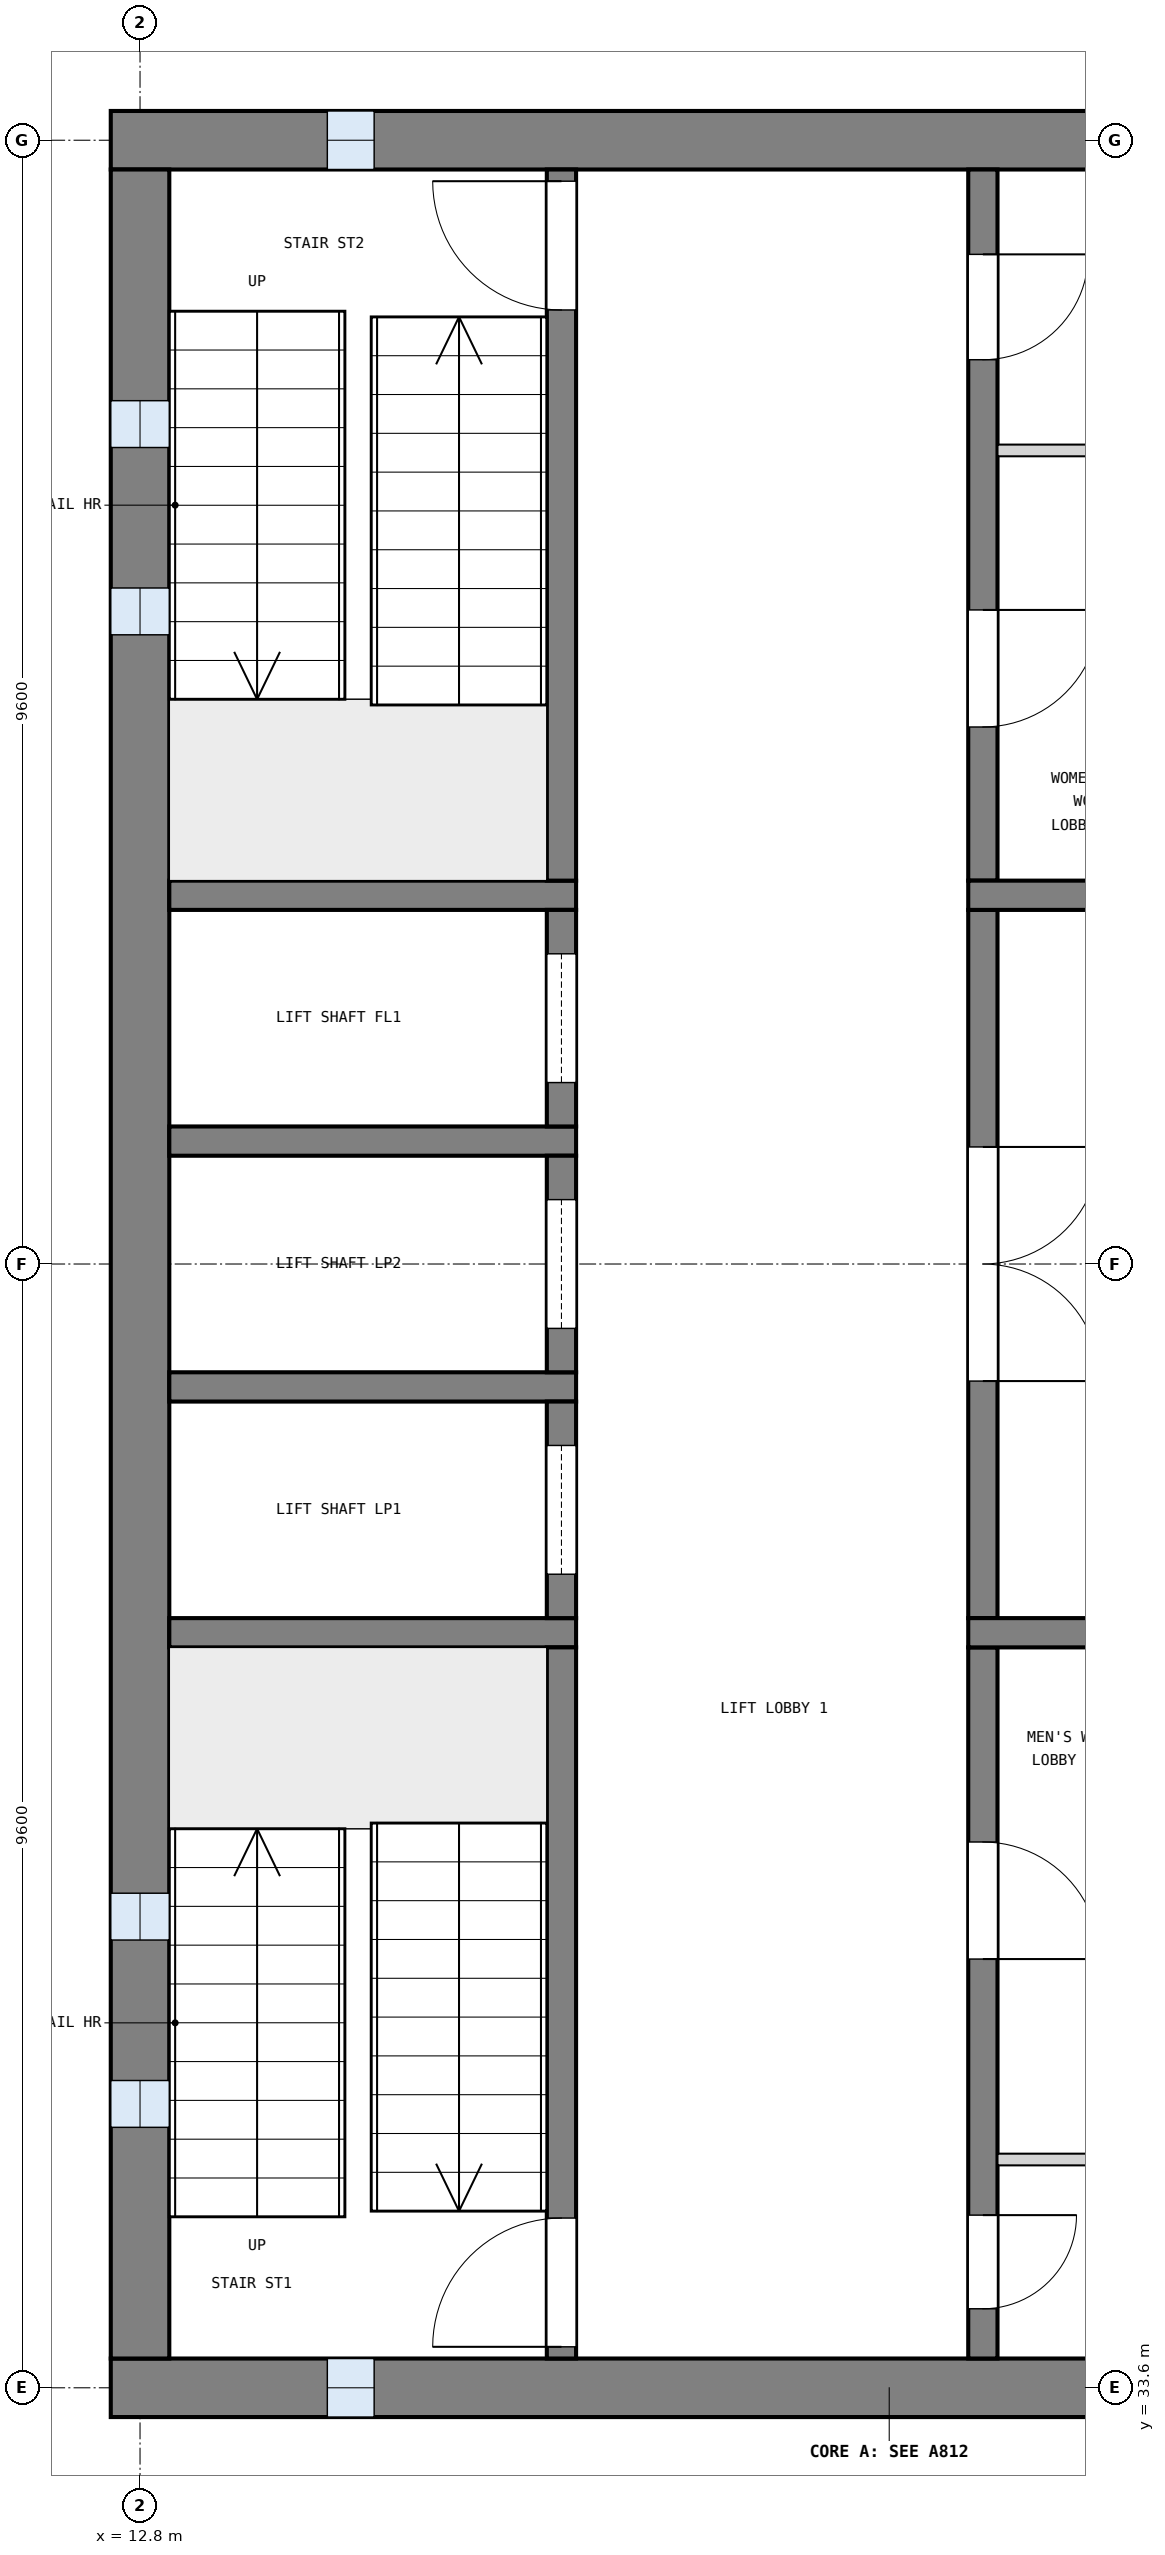
"""IFC4 building model, lengths in metres.
Left out: names, types, materials, properties, quantities, classifications, styles, units other than length and angle.
Written with IfcOpenShell. Run it as: python <this file> out.ifc"""

import sys

from ifc_helpers import new_model, si_unit, direction, frame, frame_2d, origin, place, context, subcontext, project, spatial, rectangle, extrude, element, fill, save


model = new_model("IFC4")
c1 = context("Model", 3, precision=1e-05, world=origin(), true_north=direction((0.0, 1.0)))
c2 = subcontext(c1, "Body", "Model", "MODEL_VIEW")
j1 = project(units=[si_unit("LENGTHUNIT", "METRE"), si_unit("PLANEANGLEUNIT", "RADIAN")], contexts=[c1])
p1 = place(None, origin())
s1 = spatial("IfcSite", under=j1, at=p1, CompositionType="ELEMENT")
p2 = place(p1, origin())
s2 = spatial("IfcBuilding", under=s1, at=p2, CompositionType="ELEMENT")
p3 = place(p2, frame((0.0, 0.0, 40.5)))
s3 = spatial("IfcBuildingStorey", under=s2, at=p3, CompositionType="ELEMENT", Elevation=40.5)
p4 = place(p3, frame((12.55, 52.8, 0.0), z_axis=(0.0, 0.0, 1.0), x_axis=(1.0, 0.0, 0.0)))
e1 = element("IfcWall", 1, at=p4, inside=s3, PredefinedType="SHEAR", context=c2, shape_type="SweptSolid", body=[
    extrude(rectangle(XDim=13.3, YDim=0.5, at=frame_2d((6.65, 0.0))), origin(), (0.0, 0.0, 1.0), 3.9),
])
p5 = place(p4, frame((1.85, 0.0, 1.0)))
e2 = element("IfcOpeningElement", 2, at=p5, cuts=e1, PredefinedType="OPENING", context=c2, shape_type="SweptSolid", body=[
    extrude(rectangle(XDim=0.4, YDim=2.0, at=frame_2d((0.2, 1.0))), frame((0.0, 0.26, 0.0), z_axis=(0.0, -1.0, 0.0), x_axis=(1.0, 0.0, 0.0)), (0.0, 0.0, 1.0), 0.52),
])
p6 = place(p3, frame((12.55, 33.6, 0.0), z_axis=(0.0, 0.0, 1.0), x_axis=(1.0, 0.0, 0.0)))
e3 = element("IfcWall", 3, at=p6, inside=s3, PredefinedType="SHEAR", context=c2, shape_type="SweptSolid", body=[
    extrude(rectangle(XDim=13.3, YDim=0.5, at=frame_2d((6.65, 0.0))), origin(), (0.0, 0.0, 1.0), 3.9),
])
p7 = place(p6, frame((1.85, 0.0, 1.0)))
e4 = element("IfcOpeningElement", 4, at=p7, cuts=e3, PredefinedType="OPENING", context=c2, shape_type="SweptSolid", body=[
    extrude(rectangle(XDim=0.4, YDim=2.0, at=frame_2d((0.2, 1.0))), frame((0.0, 0.26, 0.0), z_axis=(0.0, -1.0, 0.0), x_axis=(1.0, 0.0, 0.0)), (0.0, 0.0, 1.0), 0.52),
])
p8 = place(p3, frame((12.8, 33.85, 0.0), z_axis=(0.0, 0.0, 1.0), x_axis=(0.0, 1.0, 0.0)))
e5 = element("IfcWall", 5, at=p8, inside=s3, PredefinedType="SHEAR", context=c2, shape_type="SweptSolid", body=[
    extrude(rectangle(XDim=18.7, YDim=0.5, at=frame_2d((9.35, 0.0))), origin(), (0.0, 0.0, 1.0), 3.9),
])
p9 = place(p8, frame((1.975, 0.0, 1.0)))
e6 = element("IfcOpeningElement", 6, at=p9, cuts=e5, PredefinedType="OPENING", context=c2, shape_type="SweptSolid", body=[
    extrude(rectangle(XDim=0.4, YDim=2.0, at=frame_2d((0.2, 1.0))), frame((0.0, 0.26, 0.0), z_axis=(0.0, -1.0, 0.0), x_axis=(1.0, 0.0, 0.0)), (0.0, 0.0, 1.0), 0.52),
])
p10 = place(p8, frame((3.575, 0.0, 1.0)))
e7 = element("IfcOpeningElement", 7, at=p10, cuts=e5, PredefinedType="OPENING", context=c2, shape_type="SweptSolid", body=[
    extrude(rectangle(XDim=0.4, YDim=2.0, at=frame_2d((0.2, 1.0))), frame((0.0, 0.26, 0.0), z_axis=(0.0, -1.0, 0.0), x_axis=(1.0, 0.0, 0.0)), (0.0, 0.0, 1.0), 0.52),
])
p11 = place(p8, frame((14.725, 0.0, 1.0)))
e8 = element("IfcOpeningElement", 8, at=p11, cuts=e5, PredefinedType="OPENING", context=c2, shape_type="SweptSolid", body=[
    extrude(rectangle(XDim=0.4, YDim=2.0, at=frame_2d((0.2, 1.0))), frame((0.0, 0.26, 0.0), z_axis=(0.0, -1.0, 0.0), x_axis=(1.0, 0.0, 0.0)), (0.0, 0.0, 1.0), 0.52),
])
p12 = place(p8, frame((16.325, 0.0, 1.0)))
e9 = element("IfcOpeningElement", 9, at=p12, cuts=e5, PredefinedType="OPENING", context=c2, shape_type="SweptSolid", body=[
    extrude(rectangle(XDim=0.4, YDim=2.0, at=frame_2d((0.2, 1.0))), frame((0.0, 0.26, 0.0), z_axis=(0.0, -1.0, 0.0), x_axis=(1.0, 0.0, 0.0)), (0.0, 0.0, 1.0), 0.52),
])
for number, where, z_axis, x_axis in (
    (10, (13.05, 40.05, 0.0), (0.0, 0.0, 1.0), (1.0, 0.0, 0.0)),
    (11, (13.05, 42.15, 0.0), (0.0, 0.0, 1.0), (1.0, 0.0, 0.0)),
    (12, (13.05, 44.25, 0.0), (0.0, 0.0, 1.0), (1.0, 0.0, 0.0)),
    (13, (13.05, 46.35, 0.0), (0.0, 0.0, 1.0), (1.0, 0.0, 0.0)),
):
    element("IfcWall", number, at=place(p3, frame(where, z_axis=z_axis, x_axis=x_axis)), inside=s3, PredefinedType="SOLIDWALL", context=c2, shape_type="SweptSolid", body=[
        extrude(rectangle(XDim=3.475, YDim=0.25, at=frame_2d((1.737, 0.0))), origin(), (0.0, 0.0, 1.0), 3.6),
    ])
p13 = place(p3, frame((16.4, 33.85, 0.0), z_axis=(0.0, 0.0, 1.0), x_axis=(0.0, 1.0, 0.0)))
e14 = element("IfcWall", 14, at=p13, inside=s3, PredefinedType="SOLIDWALL", context=c2, shape_type="SweptSolid", body=[
    extrude(rectangle(XDim=6.075, YDim=0.25, at=frame_2d((3.038, 0.0))), origin(), (0.0, 0.0, 1.0), 3.6),
])
p14 = place(p13, frame((0.1, 0.0, 0.0)))
e15 = element("IfcOpeningElement", 15, at=p14, cuts=e14, PredefinedType="OPENING", context=c2, shape_type="SweptSolid", body=[
    extrude(rectangle(XDim=1.1, YDim=2.1, at=frame_2d((0.55, 1.05))), frame((0.0, 0.135, 0.0), z_axis=(0.0, -1.0, 0.0), x_axis=(1.0, 0.0, 0.0)), (0.0, 0.0, 1.0), 0.27),
])
p15 = place(p3, frame((16.4, 40.175, 0.0), z_axis=(0.0, 0.0, 1.0), x_axis=(0.0, 1.0, 0.0)))
e16 = element("IfcWall", 16, at=p15, inside=s3, PredefinedType="SOLIDWALL", context=c2, shape_type="SweptSolid", body=[
    extrude(rectangle(XDim=1.85, YDim=0.25, at=frame_2d((0.925, 0.0))), origin(), (0.0, 0.0, 1.0), 3.6),
])
p16 = place(p15, frame((0.375, 0.0, 0.0)))
e17 = element("IfcOpeningElement", 17, at=p16, cuts=e16, PredefinedType="OPENING", context=c2, shape_type="SweptSolid", body=[
    extrude(rectangle(XDim=1.1, YDim=2.1, at=frame_2d((0.55, 1.05))), frame((0.0, 0.135, 0.0), z_axis=(0.0, -1.0, 0.0), x_axis=(1.0, 0.0, 0.0)), (0.0, 0.0, 1.0), 0.27),
])
p17 = place(p3, frame((16.4, 42.275, 0.0), z_axis=(0.0, 0.0, 1.0), x_axis=(0.0, 1.0, 0.0)))
e18 = element("IfcWall", 18, at=p17, inside=s3, PredefinedType="SOLIDWALL", context=c2, shape_type="SweptSolid", body=[
    extrude(rectangle(XDim=1.85, YDim=0.25, at=frame_2d((0.925, 0.0))), origin(), (0.0, 0.0, 1.0), 3.6),
])
p18 = place(p17, frame((0.375, 0.0, 0.0)))
e19 = element("IfcOpeningElement", 19, at=p18, cuts=e18, PredefinedType="OPENING", context=c2, shape_type="SweptSolid", body=[
    extrude(rectangle(XDim=1.1, YDim=2.1, at=frame_2d((0.55, 1.05))), frame((0.0, 0.135, 0.0), z_axis=(0.0, -1.0, 0.0), x_axis=(1.0, 0.0, 0.0)), (0.0, 0.0, 1.0), 0.27),
])
p19 = place(p3, frame((16.4, 44.375, 0.0), z_axis=(0.0, 0.0, 1.0), x_axis=(0.0, 1.0, 0.0)))
e20 = element("IfcWall", 20, at=p19, inside=s3, PredefinedType="SOLIDWALL", context=c2, shape_type="SweptSolid", body=[
    extrude(rectangle(XDim=1.85, YDim=0.25, at=frame_2d((0.925, 0.0))), origin(), (0.0, 0.0, 1.0), 3.6),
])
p20 = place(p19, frame((0.375, 0.0, 0.0)))
e21 = element("IfcOpeningElement", 21, at=p20, cuts=e20, PredefinedType="OPENING", context=c2, shape_type="SweptSolid", body=[
    extrude(rectangle(XDim=1.1, YDim=2.1, at=frame_2d((0.55, 1.05))), frame((0.0, 0.135, 0.0), z_axis=(0.0, -1.0, 0.0), x_axis=(1.0, 0.0, 0.0)), (0.0, 0.0, 1.0), 0.27),
])
p21 = place(p3, frame((16.4, 46.475, 0.0), z_axis=(0.0, 0.0, 1.0), x_axis=(0.0, 1.0, 0.0)))
e22 = element("IfcWall", 22, at=p21, inside=s3, PredefinedType="SOLIDWALL", context=c2, shape_type="SweptSolid", body=[
    extrude(rectangle(XDim=6.075, YDim=0.25, at=frame_2d((3.038, 0.0))), origin(), (0.0, 0.0, 1.0), 3.6),
])
p22 = place(p21, frame((4.875, 0.0, 0.0)))
e23 = element("IfcOpeningElement", 23, at=p22, cuts=e22, PredefinedType="OPENING", context=c2, shape_type="SweptSolid", body=[
    extrude(rectangle(XDim=1.1, YDim=2.1, at=frame_2d((0.55, 1.05))), frame((0.0, 0.135, 0.0), z_axis=(0.0, -1.0, 0.0), x_axis=(1.0, 0.0, 0.0)), (0.0, 0.0, 1.0), 0.27),
])
p23 = place(p3, frame((20.0, 33.85, 0.0), z_axis=(0.0, 0.0, 1.0), x_axis=(0.0, 1.0, 0.0)))
e24 = element("IfcWall", 24, at=p23, inside=s3, PredefinedType="SOLIDWALL", context=c2, shape_type="SweptSolid", body=[
    extrude(rectangle(XDim=6.075, YDim=0.25, at=frame_2d((3.038, 0.0))), origin(), (0.0, 0.0, 1.0), 3.6),
])
p24 = place(p23, frame((0.425, 0.0, 0.0)))
e25 = element("IfcOpeningElement", 25, at=p24, cuts=e24, PredefinedType="OPENING", context=c2, shape_type="SweptSolid", body=[
    extrude(rectangle(XDim=0.8, YDim=2.1, at=frame_2d((0.4, 1.05))), frame((0.0, 0.135, 0.0), z_axis=(0.0, -1.0, 0.0), x_axis=(1.0, 0.0, 0.0)), (0.0, 0.0, 1.0), 0.27),
])
p25 = place(p23, frame((3.413, 0.0, 0.0)))
e26 = element("IfcOpeningElement", 26, at=p25, cuts=e24, PredefinedType="OPENING", context=c2, shape_type="SweptSolid", body=[
    extrude(rectangle(XDim=1.0, YDim=2.1, at=frame_2d((0.5, 1.05))), frame((0.0, 0.135, 0.0), z_axis=(0.0, -1.0, 0.0), x_axis=(1.0, 0.0, 0.0)), (0.0, 0.0, 1.0), 0.27),
])
p26 = place(p3, frame((20.0, 40.175, 0.0), z_axis=(0.0, 0.0, 1.0), x_axis=(0.0, 1.0, 0.0)))
e27 = element("IfcWall", 27, at=p26, inside=s3, PredefinedType="SOLIDWALL", context=c2, shape_type="SweptSolid", body=[
    extrude(rectangle(XDim=6.05, YDim=0.25, at=frame_2d((3.025, 0.0))), origin(), (0.0, 0.0, 1.0), 3.6),
])
p27 = place(p26, frame((2.025, 0.0, 0.0)))
e28 = element("IfcOpeningElement", 28, at=p27, cuts=e27, PredefinedType="OPENING", context=c2, shape_type="SweptSolid", body=[
    extrude(rectangle(XDim=2.0, YDim=2.1, at=frame_2d((1.0, 1.05))), frame((0.0, 0.135, 0.0), z_axis=(0.0, -1.0, 0.0), x_axis=(1.0, 0.0, 0.0)), (0.0, 0.0, 1.0), 0.27),
])
p28 = place(p3, frame((20.0, 46.475, 0.0), z_axis=(0.0, 0.0, 1.0), x_axis=(0.0, 1.0, 0.0)))
e29 = element("IfcWall", 29, at=p28, inside=s3, PredefinedType="SOLIDWALL", context=c2, shape_type="SweptSolid", body=[
    extrude(rectangle(XDim=6.075, YDim=0.25, at=frame_2d((3.038, 0.0))), origin(), (0.0, 0.0, 1.0), 3.6),
])
p29 = place(p28, frame((1.312, 0.0, 0.0)))
e30 = element("IfcOpeningElement", 30, at=p29, cuts=e29, PredefinedType="OPENING", context=c2, shape_type="SweptSolid", body=[
    extrude(rectangle(XDim=1.0, YDim=2.1, at=frame_2d((0.5, 1.05))), frame((0.0, 0.135, 0.0), z_axis=(0.0, -1.0, 0.0), x_axis=(1.0, 0.0, 0.0)), (0.0, 0.0, 1.0), 0.27),
])
p30 = place(p28, frame((4.45, 0.0, 0.0)))
e31 = element("IfcOpeningElement", 31, at=p30, cuts=e29, PredefinedType="OPENING", context=c2, shape_type="SweptSolid", body=[
    extrude(rectangle(XDim=0.9, YDim=2.1, at=frame_2d((0.45, 1.05))), frame((0.0, 0.135, 0.0), z_axis=(0.0, -1.0, 0.0), x_axis=(1.0, 0.0, 0.0)), (0.0, 0.0, 1.0), 0.27),
])
for number, where, z_axis, x_axis in (
    (32, (19.875, 40.05, 0.0), (0.0, 0.0, 1.0), (1.0, 0.0, 0.0)),
    (33, (19.875, 46.35, 0.0), (0.0, 0.0, 1.0), (1.0, 0.0, 0.0)),
):
    element("IfcWall", number, at=place(p3, frame(where, z_axis=z_axis, x_axis=x_axis)), inside=s3, PredefinedType="SOLIDWALL", context=c2, shape_type="SweptSolid", body=[
        extrude(rectangle(XDim=5.475, YDim=0.25, at=frame_2d((2.738, 0.0))), origin(), (0.0, 0.0, 1.0), 3.6),
    ])
for number, where, z_axis, x_axis in (
    (34, (20.125, 35.55, 0.0), (0.0, 0.0, 1.0), (1.0, 0.0, 0.0)),
    (35, (20.125, 50.15, 0.0), (0.0, 0.0, 1.0), (1.0, 0.0, 0.0)),
):
    element("IfcWall", number, at=place(p3, frame(where, z_axis=z_axis, x_axis=x_axis)), inside=s3, PredefinedType="PARTITIONING", context=c2, shape_type="SweptSolid", body=[
        extrude(rectangle(XDim=5.225, YDim=0.1, at=frame_2d((2.613, 0.0))), origin(), (0.0, 0.0, 1.0), 3.6),
    ])
p31 = place(p9, origin())
e36 = element("IfcWindow", 36, at=p31, inside=s3, PartitioningType="SINGLE_PANEL", PredefinedType="WINDOW", context=c2, shape_type="SweptSolid", body=[
    extrude(rectangle(XDim=0.4, YDim=2.0, at=frame_2d((0.2, 1.0))), frame((0.0, 0.03, 0.0), z_axis=(0.0, -1.0, 0.0), x_axis=(1.0, 0.0, 0.0)), (0.0, 0.0, 1.0), 0.06),
])
fill(e6, e36)
p32 = place(p10, origin())
e37 = element("IfcWindow", 37, at=p32, inside=s3, PartitioningType="SINGLE_PANEL", PredefinedType="WINDOW", context=c2, shape_type="SweptSolid", body=[
    extrude(rectangle(XDim=0.4, YDim=2.0, at=frame_2d((0.2, 1.0))), frame((0.0, 0.03, 0.0), z_axis=(0.0, -1.0, 0.0), x_axis=(1.0, 0.0, 0.0)), (0.0, 0.0, 1.0), 0.06),
])
fill(e7, e37)
p33 = place(p11, origin())
e38 = element("IfcWindow", 38, at=p33, inside=s3, PartitioningType="SINGLE_PANEL", PredefinedType="WINDOW", context=c2, shape_type="SweptSolid", body=[
    extrude(rectangle(XDim=0.4, YDim=2.0, at=frame_2d((0.2, 1.0))), frame((0.0, 0.03, 0.0), z_axis=(0.0, -1.0, 0.0), x_axis=(1.0, 0.0, 0.0)), (0.0, 0.0, 1.0), 0.06),
])
fill(e8, e38)
p34 = place(p12, origin())
e39 = element("IfcWindow", 39, at=p34, inside=s3, PartitioningType="SINGLE_PANEL", PredefinedType="WINDOW", context=c2, shape_type="SweptSolid", body=[
    extrude(rectangle(XDim=0.4, YDim=2.0, at=frame_2d((0.2, 1.0))), frame((0.0, 0.03, 0.0), z_axis=(0.0, -1.0, 0.0), x_axis=(1.0, 0.0, 0.0)), (0.0, 0.0, 1.0), 0.06),
])
fill(e9, e39)
p35 = place(p7, origin())
e40 = element("IfcWindow", 40, at=p35, inside=s3, PartitioningType="SINGLE_PANEL", PredefinedType="WINDOW", context=c2, shape_type="SweptSolid", body=[
    extrude(rectangle(XDim=0.4, YDim=2.0, at=frame_2d((0.2, 1.0))), frame((0.0, 0.03, 0.0), z_axis=(0.0, -1.0, 0.0), x_axis=(1.0, 0.0, 0.0)), (0.0, 0.0, 1.0), 0.06),
])
fill(e4, e40)
p36 = place(p5, origin())
e41 = element("IfcWindow", 41, at=p36, inside=s3, PartitioningType="SINGLE_PANEL", PredefinedType="WINDOW", context=c2, shape_type="SweptSolid", body=[
    extrude(rectangle(XDim=0.4, YDim=2.0, at=frame_2d((0.2, 1.0))), frame((0.0, 0.03, 0.0), z_axis=(0.0, -1.0, 0.0), x_axis=(1.0, 0.0, 0.0)), (0.0, 0.0, 1.0), 0.06),
])
fill(e2, e41)
p37 = place(p14, origin())
e42 = element("IfcDoor", 42, at=p37, inside=s3, OperationType="SINGLE_SWING_LEFT", PredefinedType="DOOR", context=c2, shape_type="SweptSolid", body=[
    extrude(rectangle(XDim=1.1, YDim=2.1, at=frame_2d((0.55, 1.05))), frame((0.0, 0.025, 0.0), z_axis=(0.0, -1.0, 0.0), x_axis=(1.0, 0.0, 0.0)), (0.0, 0.0, 1.0), 0.05),
])
fill(e15, e42)
p38 = place(p22, origin())
e43 = element("IfcDoor", 43, at=p38, inside=s3, OperationType="SINGLE_SWING_RIGHT", PredefinedType="DOOR", context=c2, shape_type="SweptSolid", body=[
    extrude(rectangle(XDim=1.1, YDim=2.1, at=frame_2d((0.55, 1.05))), frame((0.0, 0.025, 0.0), z_axis=(0.0, -1.0, 0.0), x_axis=(1.0, 0.0, 0.0)), (0.0, 0.0, 1.0), 0.05),
])
fill(e23, e43)
p39 = place(p16, origin())
e44 = element("IfcDoor", 44, at=p39, inside=s3, OperationType="SLIDING_TO_LEFT", PredefinedType="DOOR", context=c2, shape_type="SweptSolid", body=[
    extrude(rectangle(XDim=1.1, YDim=2.1, at=frame_2d((0.55, 1.05))), frame((0.0, 0.025, 0.0), z_axis=(0.0, -1.0, 0.0), x_axis=(1.0, 0.0, 0.0)), (0.0, 0.0, 1.0), 0.05),
])
fill(e17, e44)
p40 = place(p18, origin())
e45 = element("IfcDoor", 45, at=p40, inside=s3, OperationType="SLIDING_TO_LEFT", PredefinedType="DOOR", context=c2, shape_type="SweptSolid", body=[
    extrude(rectangle(XDim=1.1, YDim=2.1, at=frame_2d((0.55, 1.05))), frame((0.0, 0.025, 0.0), z_axis=(0.0, -1.0, 0.0), x_axis=(1.0, 0.0, 0.0)), (0.0, 0.0, 1.0), 0.05),
])
fill(e19, e45)
p41 = place(p20, origin())
e46 = element("IfcDoor", 46, at=p41, inside=s3, OperationType="SLIDING_TO_LEFT", PredefinedType="DOOR", context=c2, shape_type="SweptSolid", body=[
    extrude(rectangle(XDim=1.1, YDim=2.1, at=frame_2d((0.55, 1.05))), frame((0.0, 0.025, 0.0), z_axis=(0.0, -1.0, 0.0), x_axis=(1.0, 0.0, 0.0)), (0.0, 0.0, 1.0), 0.05),
])
fill(e21, e46)
p42 = place(p27, frame((2.0, 0.0, 0.0), z_axis=(0.0, 0.0, 1.0), x_axis=(-1.0, 0.0, 0.0)))
e47 = element("IfcDoor", 47, at=p42, inside=s3, OperationType="DOUBLE_DOOR_SINGLE_SWING", PredefinedType="DOOR", context=c2, shape_type="SweptSolid", body=[
    extrude(rectangle(XDim=2.0, YDim=2.1, at=frame_2d((1.0, 1.05))), frame((0.0, 0.025, 0.0), z_axis=(0.0, -1.0, 0.0), x_axis=(1.0, 0.0, 0.0)), (0.0, 0.0, 1.0), 0.05),
])
fill(e28, e47)
p43 = place(p24, frame((0.8, 0.0, 0.0), z_axis=(0.0, 0.0, 1.0), x_axis=(-1.0, 0.0, 0.0)))
e48 = element("IfcDoor", 48, at=p43, inside=s3, OperationType="SINGLE_SWING_LEFT", PredefinedType="DOOR", context=c2, shape_type="SweptSolid", body=[
    extrude(rectangle(XDim=0.8, YDim=2.1, at=frame_2d((0.4, 1.05))), frame((0.0, 0.025, 0.0), z_axis=(0.0, -1.0, 0.0), x_axis=(1.0, 0.0, 0.0)), (0.0, 0.0, 1.0), 0.05),
])
fill(e25, e48)
p44 = place(p25, frame((1.0, 0.0, 0.0), z_axis=(0.0, 0.0, 1.0), x_axis=(-1.0, 0.0, 0.0)))
e49 = element("IfcDoor", 49, at=p44, inside=s3, OperationType="SINGLE_SWING_RIGHT", PredefinedType="DOOR", context=c2, shape_type="SweptSolid", body=[
    extrude(rectangle(XDim=1.0, YDim=2.1, at=frame_2d((0.5, 1.05))), frame((0.0, 0.025, 0.0), z_axis=(0.0, -1.0, 0.0), x_axis=(1.0, 0.0, 0.0)), (0.0, 0.0, 1.0), 0.05),
])
fill(e26, e49)
p45 = place(p29, frame((1.0, 0.0, 0.0), z_axis=(0.0, 0.0, 1.0), x_axis=(-1.0, 0.0, 0.0)))
e50 = element("IfcDoor", 50, at=p45, inside=s3, OperationType="SINGLE_SWING_LEFT", PredefinedType="DOOR", context=c2, shape_type="SweptSolid", body=[
    extrude(rectangle(XDim=1.0, YDim=2.1, at=frame_2d((0.5, 1.05))), frame((0.0, 0.025, 0.0), z_axis=(0.0, -1.0, 0.0), x_axis=(1.0, 0.0, 0.0)), (0.0, 0.0, 1.0), 0.05),
])
fill(e30, e50)
p46 = place(p30, frame((0.9, 0.0, 0.0), z_axis=(0.0, 0.0, 1.0), x_axis=(-1.0, 0.0, 0.0)))
e51 = element("IfcDoor", 51, at=p46, inside=s3, OperationType="SINGLE_SWING_LEFT", PredefinedType="DOOR", context=c2, shape_type="SweptSolid", body=[
    extrude(rectangle(XDim=0.9, YDim=2.1, at=frame_2d((0.45, 1.05))), frame((0.0, 0.025, 0.0), z_axis=(0.0, -1.0, 0.0), x_axis=(1.0, 0.0, 0.0)), (0.0, 0.0, 1.0), 0.05),
])
fill(e31, e51)
save(model, sys.argv[1])
